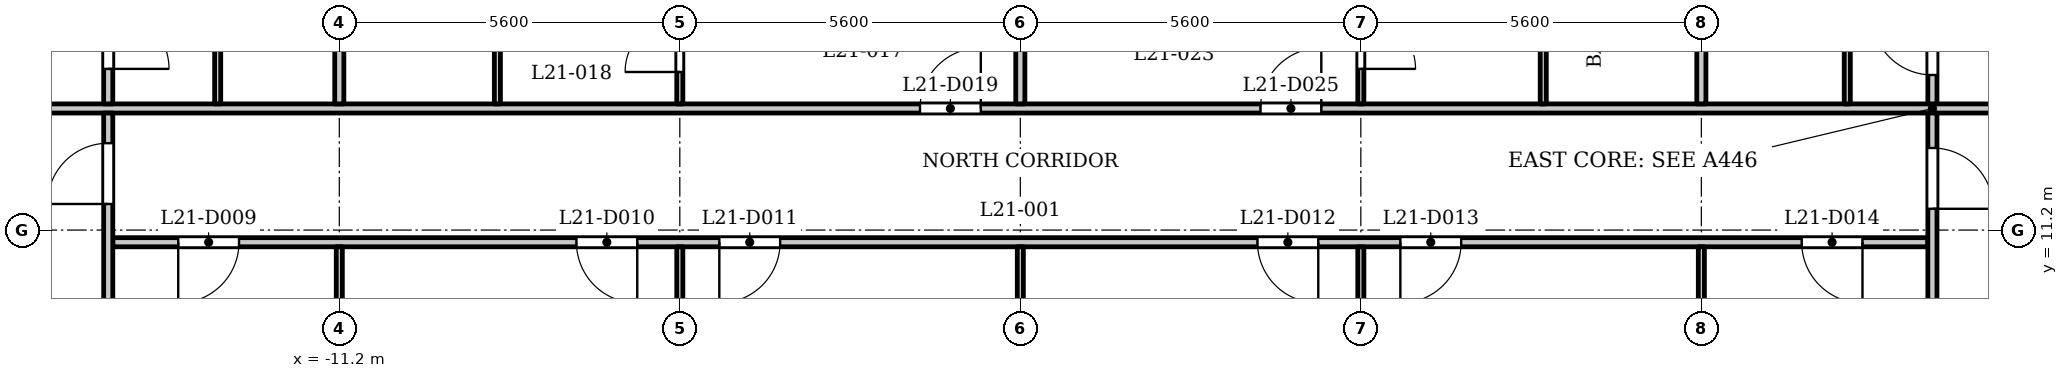
"""IFC4 building model, lengths in metres.
Left out: names, types, materials, properties, quantities, classifications, styles, units other than length and angle.
Written with IfcOpenShell. Run it as: python <this file> out.ifc"""

import sys

from ifc_helpers import new_model, si_unit, direction, frame, frame_2d, origin, place, context, subcontext, project, spatial, rectangle, extrude, element, fill, save


model = new_model("IFC4")
c1 = context("Model", 3, precision=1e-05, world=origin(), true_north=direction((0.0, 1.0)))
c2 = subcontext(c1, "Body", "Model", "MODEL_VIEW")
j1 = project(units=[si_unit("LENGTHUNIT", "METRE"), si_unit("PLANEANGLEUNIT", "RADIAN")], contexts=[c1])
p1 = place(None, origin())
s1 = spatial("IfcSite", under=j1, at=p1, CompositionType="ELEMENT")
p2 = place(p1, origin())
s2 = spatial("IfcBuilding", under=s1, at=p2, CompositionType="ELEMENT")
p3 = place(p2, frame((0.0, 0.0, 86.8)))
s3 = spatial("IfcBuildingStorey", under=s2, at=p3, CompositionType="ELEMENT", Elevation=86.8)
p4 = place(p3, frame((-14.925, 11.0, 0.0), z_axis=(0.0, 0.0, 1.0), x_axis=(1.0, 0.0, 0.0)))
e1 = element("IfcWall", 1, at=p4, inside=s3, PredefinedType="PARTITIONING", context=c2, shape_type="SweptSolid", body=[
    extrude(rectangle(XDim=29.85, YDim=0.15, at=frame_2d((14.925, 0.0))), origin(), (0.0, 0.0, 1.0), 3.2),
])
p5 = place(p4, frame((1.076, 0.0, 0.0)))
e2 = element("IfcOpeningElement", 2, at=p5, cuts=e1, PredefinedType="OPENING", context=c2, shape_type="SweptSolid", body=[
    extrude(rectangle(XDim=1.0, YDim=2.1, at=frame_2d((0.5, 1.05))), frame((0.0, 0.085, 0.0), z_axis=(0.0, -1.0, 0.0), x_axis=(1.0, 0.0, 0.0)), (0.0, 0.0, 1.0), 0.17),
])
p6 = place(p4, frame((7.625, 0.0, 0.0)))
e3 = element("IfcOpeningElement", 3, at=p6, cuts=e1, PredefinedType="OPENING", context=c2, shape_type="SweptSolid", body=[
    extrude(rectangle(XDim=1.0, YDim=2.1, at=frame_2d((0.5, 1.05))), frame((0.0, 0.085, 0.0), z_axis=(0.0, -1.0, 0.0), x_axis=(1.0, 0.0, 0.0)), (0.0, 0.0, 1.0), 0.17),
])
p7 = place(p4, frame((9.975, 0.0, 0.0)))
e4 = element("IfcOpeningElement", 4, at=p7, cuts=e1, PredefinedType="OPENING", context=c2, shape_type="SweptSolid", body=[
    extrude(rectangle(XDim=1.0, YDim=2.1, at=frame_2d((0.5, 1.05))), frame((0.0, 0.085, 0.0), z_axis=(0.0, -1.0, 0.0), x_axis=(1.0, 0.0, 0.0)), (0.0, 0.0, 1.0), 0.17),
])
p8 = place(p4, frame((18.825, 0.0, 0.0)))
e5 = element("IfcOpeningElement", 5, at=p8, cuts=e1, PredefinedType="OPENING", context=c2, shape_type="SweptSolid", body=[
    extrude(rectangle(XDim=1.0, YDim=2.1, at=frame_2d((0.5, 1.05))), frame((0.0, 0.085, 0.0), z_axis=(0.0, -1.0, 0.0), x_axis=(1.0, 0.0, 0.0)), (0.0, 0.0, 1.0), 0.17),
])
p9 = place(p4, frame((21.175, 0.0, 0.0)))
e6 = element("IfcOpeningElement", 6, at=p9, cuts=e1, PredefinedType="OPENING", context=c2, shape_type="SweptSolid", body=[
    extrude(rectangle(XDim=1.0, YDim=2.1, at=frame_2d((0.5, 1.05))), frame((0.0, 0.085, 0.0), z_axis=(0.0, -1.0, 0.0), x_axis=(1.0, 0.0, 0.0)), (0.0, 0.0, 1.0), 0.17),
])
p10 = place(p4, frame((27.775, 0.0, 0.0)))
e7 = element("IfcOpeningElement", 7, at=p10, cuts=e1, PredefinedType="OPENING", context=c2, shape_type="SweptSolid", body=[
    extrude(rectangle(XDim=1.0, YDim=2.1, at=frame_2d((0.5, 1.05))), frame((0.0, 0.085, 0.0), z_axis=(0.0, -1.0, 0.0), x_axis=(1.0, 0.0, 0.0)), (0.0, 0.0, 1.0), 0.17),
])
p11 = place(p3, frame((-17.4, 13.2, 0.0), z_axis=(0.0, 0.0, 1.0), x_axis=(1.0, 0.0, 0.0)))
e8 = element("IfcWall", 8, at=p11, inside=s3, PredefinedType="PARTITIONING", context=c2, shape_type="SweptSolid", body=[
    extrude(rectangle(XDim=34.8, YDim=0.15, at=frame_2d((17.4, 0.0))), origin(), (0.0, 0.0, 1.0), 3.2),
])
p12 = place(p11, frame((0.25, 0.0, 0.0)))
e9 = element("IfcOpeningElement", 9, at=p12, cuts=e8, PredefinedType="OPENING", context=c2, shape_type="SweptSolid", body=[
    extrude(rectangle(XDim=1.0, YDim=2.1, at=frame_2d((0.5, 1.05))), frame((0.0, 0.085, 0.0), z_axis=(0.0, -1.0, 0.0), x_axis=(1.0, 0.0, 0.0)), (0.0, 0.0, 1.0), 0.17),
])
p13 = place(p11, frame((33.65, 0.0, 0.0)))
e10 = element("IfcOpeningElement", 10, at=p13, cuts=e8, PredefinedType="OPENING", context=c2, shape_type="SweptSolid", body=[
    extrude(rectangle(XDim=1.0, YDim=2.1, at=frame_2d((0.5, 1.05))), frame((0.0, 0.085, 0.0), z_axis=(0.0, -1.0, 0.0), x_axis=(1.0, 0.0, 0.0)), (0.0, 0.0, 1.0), 0.17),
])
p14 = place(p11, frame((15.75, 0.0, 0.0)))
e11 = element("IfcOpeningElement", 11, at=p14, cuts=e8, PredefinedType="OPENING", context=c2, shape_type="SweptSolid", body=[
    extrude(rectangle(XDim=1.0, YDim=2.1, at=frame_2d((0.5, 1.05))), frame((0.0, 0.085, 0.0), z_axis=(0.0, -1.0, 0.0), x_axis=(1.0, 0.0, 0.0)), (0.0, 0.0, 1.0), 0.17),
])
p15 = place(p11, frame((21.35, 0.0, 0.0)))
e12 = element("IfcOpeningElement", 12, at=p15, cuts=e8, PredefinedType="OPENING", context=c2, shape_type="SweptSolid", body=[
    extrude(rectangle(XDim=1.0, YDim=2.1, at=frame_2d((0.5, 1.05))), frame((0.0, 0.085, 0.0), z_axis=(0.0, -1.0, 0.0), x_axis=(1.0, 0.0, 0.0)), (0.0, 0.0, 1.0), 0.17),
])
p16 = place(p3, frame((-15.0, 6.769, 0.0), z_axis=(0.0, 0.0, 1.0), x_axis=(0.0, 1.0, 0.0)))
e13 = element("IfcWall", 13, at=p16, inside=s3, PredefinedType="PARTITIONING", context=c2, shape_type="SweptSolid", body=[
    extrude(rectangle(XDim=6.356, YDim=0.15, at=frame_2d((3.178, 0.0))), origin(), (0.0, 0.0, 1.0), 3.2),
])
p17 = place(p16, frame((4.86, 0.0, 0.0)))
e14 = element("IfcOpeningElement", 14, at=p17, cuts=e13, PredefinedType="OPENING", context=c2, shape_type="SweptSolid", body=[
    extrude(rectangle(XDim=1.0, YDim=2.1, at=frame_2d((0.5, 1.05))), frame((0.0, 0.085, 0.0), z_axis=(0.0, -1.0, 0.0), x_axis=(1.0, 0.0, 0.0)), (0.0, 0.0, 1.0), 0.17),
])
p18 = place(p3, frame((-15.0, 13.275, 0.0), z_axis=(0.0, 0.0, 1.0), x_axis=(0.0, 1.0, 0.0)))
e15 = element("IfcWall", 15, at=p18, inside=s3, PredefinedType="PARTITIONING", context=c2, shape_type="SweptSolid", body=[
    extrude(rectangle(XDim=2.05, YDim=0.15, at=frame_2d((1.025, 0.0))), origin(), (0.0, 0.0, 1.0), 3.2),
])
p19 = place(p18, frame((0.576, 0.0, 0.0)))
e16 = element("IfcOpeningElement", 16, at=p19, cuts=e15, PredefinedType="OPENING", context=c2, shape_type="SweptSolid", body=[
    extrude(rectangle(XDim=1.0, YDim=2.1, at=frame_2d((0.5, 1.05))), frame((0.0, 0.085, 0.0), z_axis=(0.0, -1.0, 0.0), x_axis=(1.0, 0.0, 0.0)), (0.0, 0.0, 1.0), 0.17),
])
p20 = place(p3, frame((-13.2, 13.275, 0.0), z_axis=(0.0, 0.0, 1.0), x_axis=(0.0, 1.0, 0.0)))
e17 = element("IfcWall", 17, at=p20, inside=s3, PredefinedType="PARTITIONING", context=c2, shape_type="SweptSolid", body=[
    extrude(rectangle(XDim=3.775, YDim=0.1, at=frame_2d((1.888, 0.0))), origin(), (0.0, 0.0, 1.0), 3.2),
])
p21 = place(p3, frame((-11.2, 7.32, 0.0), z_axis=(0.0, 0.0, 1.0), x_axis=(0.0, 1.0, 0.0)))
e18 = element("IfcWall", 18, at=p21, inside=s3, PredefinedType="PARTITIONING", context=c2, shape_type="SweptSolid", body=[
    extrude(rectangle(XDim=3.605, YDim=0.1, at=frame_2d((1.802, 0.0))), origin(), (0.0, 0.0, 1.0), 3.2),
])
p22 = place(p3, frame((-11.2, 13.275, 0.0), z_axis=(0.0, 0.0, 1.0), x_axis=(0.0, 1.0, 0.0)))
e19 = element("IfcWall", 19, at=p22, inside=s3, PredefinedType="PARTITIONING", context=c2, shape_type="SweptSolid", body=[
    extrude(rectangle(XDim=3.775, YDim=0.15, at=frame_2d((1.888, 0.0))), origin(), (0.0, 0.0, 1.0), 3.2),
])
p23 = place(p3, frame((-8.6, 13.275, 0.0), z_axis=(0.0, 0.0, 1.0), x_axis=(0.0, 1.0, 0.0)))
e20 = element("IfcWall", 20, at=p23, inside=s3, PredefinedType="PARTITIONING", context=c2, shape_type="SweptSolid", body=[
    extrude(rectangle(XDim=3.775, YDim=0.1, at=frame_2d((1.888, 0.0))), origin(), (0.0, 0.0, 1.0), 3.2),
])
p24 = place(p3, frame((-5.6, 7.32, 0.0), z_axis=(0.0, 0.0, 1.0), x_axis=(0.0, 1.0, 0.0)))
e21 = element("IfcWall", 21, at=p24, inside=s3, PredefinedType="PARTITIONING", context=c2, shape_type="SweptSolid", body=[
    extrude(rectangle(XDim=3.605, YDim=0.1, at=frame_2d((1.802, 0.0))), origin(), (0.0, 0.0, 1.0), 3.2),
])
p25 = place(p3, frame((-5.6, 13.275, 0.0), z_axis=(0.0, 0.0, 1.0), x_axis=(0.0, 1.0, 0.0)))
e22 = element("IfcWall", 22, at=p25, inside=s3, PredefinedType="PARTITIONING", context=c2, shape_type="SweptSolid", body=[
    extrude(rectangle(XDim=3.775, YDim=0.1, at=frame_2d((1.888, 0.0))), origin(), (0.0, 0.0, 1.0), 3.2),
])
p26 = place(p25, frame((0.525, 0.0, 0.0)))
e23 = element("IfcOpeningElement", 23, at=p26, cuts=e22, PredefinedType="OPENING", context=c2, shape_type="SweptSolid", body=[
    extrude(rectangle(XDim=0.9, YDim=2.1, at=frame_2d((0.45, 1.05))), frame((0.0, 0.06, 0.0), z_axis=(0.0, -1.0, 0.0), x_axis=(1.0, 0.0, 0.0)), (0.0, 0.0, 1.0), 0.12),
])
p27 = place(p3, frame((0.0, 7.32, 0.0), z_axis=(0.0, 0.0, 1.0), x_axis=(0.0, 1.0, 0.0)))
e24 = element("IfcWall", 24, at=p27, inside=s3, PredefinedType="PARTITIONING", context=c2, shape_type="SweptSolid", body=[
    extrude(rectangle(XDim=3.605, YDim=0.1, at=frame_2d((1.802, 0.0))), origin(), (0.0, 0.0, 1.0), 3.2),
])
p28 = place(p3, frame((0.0, 13.275, 0.0), z_axis=(0.0, 0.0, 1.0), x_axis=(0.0, 1.0, 0.0)))
e25 = element("IfcWall", 25, at=p28, inside=s3, PredefinedType="PARTITIONING", context=c2, shape_type="SweptSolid", body=[
    extrude(rectangle(XDim=3.775, YDim=0.15, at=frame_2d((1.888, 0.0))), origin(), (0.0, 0.0, 1.0), 3.2),
])
p29 = place(p3, frame((5.6, 7.32, 0.0), z_axis=(0.0, 0.0, 1.0), x_axis=(0.0, 1.0, 0.0)))
e26 = element("IfcWall", 26, at=p29, inside=s3, PredefinedType="PARTITIONING", context=c2, shape_type="SweptSolid", body=[
    extrude(rectangle(XDim=3.605, YDim=0.1, at=frame_2d((1.802, 0.0))), origin(), (0.0, 0.0, 1.0), 3.2),
])
p30 = place(p3, frame((5.6, 13.275, 0.0), z_axis=(0.0, 0.0, 1.0), x_axis=(0.0, 1.0, 0.0)))
e27 = element("IfcWall", 27, at=p30, inside=s3, PredefinedType="PARTITIONING", context=c2, shape_type="SweptSolid", body=[
    extrude(rectangle(XDim=3.775, YDim=0.1, at=frame_2d((1.888, 0.0))), origin(), (0.0, 0.0, 1.0), 3.2),
])
p31 = place(p30, frame((0.576, 0.0, 0.0)))
e28 = element("IfcOpeningElement", 28, at=p31, cuts=e27, PredefinedType="OPENING", context=c2, shape_type="SweptSolid", body=[
    extrude(rectangle(XDim=0.9, YDim=2.1, at=frame_2d((0.45, 1.05))), frame((0.0, 0.06, 0.0), z_axis=(0.0, -1.0, 0.0), x_axis=(1.0, 0.0, 0.0)), (0.0, 0.0, 1.0), 0.12),
])
p32 = place(p3, frame((8.6, 13.275, 0.0), z_axis=(0.0, 0.0, 1.0), x_axis=(0.0, 1.0, 0.0)))
e29 = element("IfcWall", 29, at=p32, inside=s3, PredefinedType="PARTITIONING", context=c2, shape_type="SweptSolid", body=[
    extrude(rectangle(XDim=3.775, YDim=0.1, at=frame_2d((1.888, 0.0))), origin(), (0.0, 0.0, 1.0), 3.2),
])
p33 = place(p3, frame((11.2, 7.32, 0.0), z_axis=(0.0, 0.0, 1.0), x_axis=(0.0, 1.0, 0.0)))
e30 = element("IfcWall", 30, at=p33, inside=s3, PredefinedType="PARTITIONING", context=c2, shape_type="SweptSolid", body=[
    extrude(rectangle(XDim=3.605, YDim=0.1, at=frame_2d((1.802, 0.0))), origin(), (0.0, 0.0, 1.0), 3.2),
])
p34 = place(p3, frame((11.2, 13.275, 0.0), z_axis=(0.0, 0.0, 1.0), x_axis=(0.0, 1.0, 0.0)))
e31 = element("IfcWall", 31, at=p34, inside=s3, PredefinedType="PARTITIONING", context=c2, shape_type="SweptSolid", body=[
    extrude(rectangle(XDim=3.775, YDim=0.15, at=frame_2d((1.888, 0.0))), origin(), (0.0, 0.0, 1.0), 3.2),
])
p35 = place(p3, frame((13.6, 13.275, 0.0), z_axis=(0.0, 0.0, 1.0), x_axis=(0.0, 1.0, 0.0)))
e32 = element("IfcWall", 32, at=p35, inside=s3, PredefinedType="PARTITIONING", context=c2, shape_type="SweptSolid", body=[
    extrude(rectangle(XDim=3.775, YDim=0.1, at=frame_2d((1.888, 0.0))), origin(), (0.0, 0.0, 1.0), 3.2),
])
p36 = place(p3, frame((15.0, 6.769, 0.0), z_axis=(0.0, 0.0, 1.0), x_axis=(0.0, 1.0, 0.0)))
e33 = element("IfcWall", 33, at=p36, inside=s3, PredefinedType="PARTITIONING", context=c2, shape_type="SweptSolid", body=[
    extrude(rectangle(XDim=6.356, YDim=0.15, at=frame_2d((3.178, 0.0))), origin(), (0.0, 0.0, 1.0), 3.2),
])
p37 = place(p36, frame((4.781, 0.0, 0.0)))
e34 = element("IfcOpeningElement", 34, at=p37, cuts=e33, PredefinedType="OPENING", context=c2, shape_type="SweptSolid", body=[
    extrude(rectangle(XDim=1.0, YDim=2.1, at=frame_2d((0.5, 1.05))), frame((0.0, 0.085, 0.0), z_axis=(0.0, -1.0, 0.0), x_axis=(1.0, 0.0, 0.0)), (0.0, 0.0, 1.0), 0.17),
])
p38 = place(p3, frame((15.0, 13.275, 0.0), z_axis=(0.0, 0.0, 1.0), x_axis=(0.0, 1.0, 0.0)))
e35 = element("IfcWall", 35, at=p38, inside=s3, PredefinedType="PARTITIONING", context=c2, shape_type="SweptSolid", body=[
    extrude(rectangle(XDim=2.05, YDim=0.15, at=frame_2d((1.025, 0.0))), origin(), (0.0, 0.0, 1.0), 3.2),
])
p39 = place(p38, frame((0.476, 0.0, 0.0)))
e36 = element("IfcOpeningElement", 36, at=p39, cuts=e35, PredefinedType="OPENING", context=c2, shape_type="SweptSolid", body=[
    extrude(rectangle(XDim=1.0, YDim=2.1, at=frame_2d((0.5, 1.05))), frame((0.0, 0.085, 0.0), z_axis=(0.0, -1.0, 0.0), x_axis=(1.0, 0.0, 0.0)), (0.0, 0.0, 1.0), 0.17),
])
p40 = place(p17, origin())
e37 = element("IfcDoor", 37, at=p40, inside=s3, OperationType="SINGLE_SWING_RIGHT", PredefinedType="DOOR", context=c2, shape_type="SweptSolid", body=[
    extrude(rectangle(XDim=1.0, YDim=2.1, at=frame_2d((0.5, 1.05))), frame((0.0, 0.025, 0.0), z_axis=(0.0, -1.0, 0.0), x_axis=(1.0, 0.0, 0.0)), (0.0, 0.0, 1.0), 0.05),
])
fill(e14, e37)
p41 = place(p37, origin())
e38 = element("IfcDoor", 38, at=p41, inside=s3, OperationType="SINGLE_SWING_LEFT", PredefinedType="DOOR", context=c2, shape_type="SweptSolid", body=[
    extrude(rectangle(XDim=1.0, YDim=2.1, at=frame_2d((0.5, 1.05))), frame((0.0, 0.025, 0.0), z_axis=(0.0, -1.0, 0.0), x_axis=(1.0, 0.0, 0.0)), (0.0, 0.0, 1.0), 0.05),
])
fill(e34, e38)
p42 = place(p5, origin())
e39 = element("IfcDoor", 39, at=p42, inside=s3, OperationType="SINGLE_SWING_LEFT", PredefinedType="DOOR", context=c2, shape_type="SweptSolid", body=[
    extrude(rectangle(XDim=1.0, YDim=2.1, at=frame_2d((0.5, 1.05))), frame((0.0, 0.025, 0.0), z_axis=(0.0, -1.0, 0.0), x_axis=(1.0, 0.0, 0.0)), (0.0, 0.0, 1.0), 0.05),
])
fill(e2, e39)
p43 = place(p6, origin())
e40 = element("IfcDoor", 40, at=p43, inside=s3, OperationType="SINGLE_SWING_RIGHT", PredefinedType="DOOR", context=c2, shape_type="SweptSolid", body=[
    extrude(rectangle(XDim=1.0, YDim=2.1, at=frame_2d((0.5, 1.05))), frame((0.0, 0.025, 0.0), z_axis=(0.0, -1.0, 0.0), x_axis=(1.0, 0.0, 0.0)), (0.0, 0.0, 1.0), 0.05),
])
fill(e3, e40)
p44 = place(p7, origin())
e41 = element("IfcDoor", 41, at=p44, inside=s3, OperationType="SINGLE_SWING_LEFT", PredefinedType="DOOR", context=c2, shape_type="SweptSolid", body=[
    extrude(rectangle(XDim=1.0, YDim=2.1, at=frame_2d((0.5, 1.05))), frame((0.0, 0.025, 0.0), z_axis=(0.0, -1.0, 0.0), x_axis=(1.0, 0.0, 0.0)), (0.0, 0.0, 1.0), 0.05),
])
fill(e4, e41)
p45 = place(p8, origin())
e42 = element("IfcDoor", 42, at=p45, inside=s3, OperationType="SINGLE_SWING_RIGHT", PredefinedType="DOOR", context=c2, shape_type="SweptSolid", body=[
    extrude(rectangle(XDim=1.0, YDim=2.1, at=frame_2d((0.5, 1.05))), frame((0.0, 0.025, 0.0), z_axis=(0.0, -1.0, 0.0), x_axis=(1.0, 0.0, 0.0)), (0.0, 0.0, 1.0), 0.05),
])
fill(e5, e42)
p46 = place(p9, origin())
e43 = element("IfcDoor", 43, at=p46, inside=s3, OperationType="SINGLE_SWING_LEFT", PredefinedType="DOOR", context=c2, shape_type="SweptSolid", body=[
    extrude(rectangle(XDim=1.0, YDim=2.1, at=frame_2d((0.5, 1.05))), frame((0.0, 0.025, 0.0), z_axis=(0.0, -1.0, 0.0), x_axis=(1.0, 0.0, 0.0)), (0.0, 0.0, 1.0), 0.05),
])
fill(e6, e43)
p47 = place(p10, origin())
e44 = element("IfcDoor", 44, at=p47, inside=s3, OperationType="SINGLE_SWING_RIGHT", PredefinedType="DOOR", context=c2, shape_type="SweptSolid", body=[
    extrude(rectangle(XDim=1.0, YDim=2.1, at=frame_2d((0.5, 1.05))), frame((0.0, 0.025, 0.0), z_axis=(0.0, -1.0, 0.0), x_axis=(1.0, 0.0, 0.0)), (0.0, 0.0, 1.0), 0.05),
])
fill(e7, e44)
p48 = place(p19, origin())
e45 = element("IfcDoor", 45, at=p48, inside=s3, OperationType="SINGLE_SWING_LEFT", PredefinedType="DOOR", context=c2, shape_type="SweptSolid", body=[
    extrude(rectangle(XDim=1.0, YDim=2.1, at=frame_2d((0.5, 1.05))), frame((0.0, 0.025, 0.0), z_axis=(0.0, -1.0, 0.0), x_axis=(1.0, 0.0, 0.0)), (0.0, 0.0, 1.0), 0.05),
])
fill(e16, e45)
p49 = place(p14, origin())
e46 = element("IfcDoor", 46, at=p49, inside=s3, OperationType="SINGLE_SWING_LEFT", PredefinedType="DOOR", context=c2, shape_type="SweptSolid", body=[
    extrude(rectangle(XDim=1.0, YDim=2.1, at=frame_2d((0.5, 1.05))), frame((0.0, 0.025, 0.0), z_axis=(0.0, -1.0, 0.0), x_axis=(1.0, 0.0, 0.0)), (0.0, 0.0, 1.0), 0.05),
])
fill(e11, e46)
p50 = place(p26, origin())
e47 = element("IfcDoor", 47, at=p50, inside=s3, OperationType="SINGLE_SWING_RIGHT", PredefinedType="DOOR", context=c2, shape_type="SweptSolid", body=[
    extrude(rectangle(XDim=0.9, YDim=2.1, at=frame_2d((0.45, 1.05))), frame((0.0, 0.025, 0.0), z_axis=(0.0, -1.0, 0.0), x_axis=(1.0, 0.0, 0.0)), (0.0, 0.0, 1.0), 0.05),
])
fill(e23, e47)
p51 = place(p15, origin())
e48 = element("IfcDoor", 48, at=p51, inside=s3, OperationType="SINGLE_SWING_LEFT", PredefinedType="DOOR", context=c2, shape_type="SweptSolid", body=[
    extrude(rectangle(XDim=1.0, YDim=2.1, at=frame_2d((0.5, 1.05))), frame((0.0, 0.025, 0.0), z_axis=(0.0, -1.0, 0.0), x_axis=(1.0, 0.0, 0.0)), (0.0, 0.0, 1.0), 0.05),
])
fill(e12, e48)
p52 = place(p31, origin())
e49 = element("IfcDoor", 49, at=p52, inside=s3, OperationType="SINGLE_SWING_LEFT", PredefinedType="DOOR", context=c2, shape_type="SweptSolid", body=[
    extrude(rectangle(XDim=0.9, YDim=2.1, at=frame_2d((0.45, 1.05))), frame((0.0, 0.025, 0.0), z_axis=(0.0, -1.0, 0.0), x_axis=(1.0, 0.0, 0.0)), (0.0, 0.0, 1.0), 0.05),
])
fill(e28, e49)
p53 = place(p39, origin())
e50 = element("IfcDoor", 50, at=p53, inside=s3, OperationType="SINGLE_SWING_LEFT", PredefinedType="DOOR", context=c2, shape_type="SweptSolid", body=[
    extrude(rectangle(XDim=1.0, YDim=2.1, at=frame_2d((0.5, 1.05))), frame((0.0, 0.025, 0.0), z_axis=(0.0, -1.0, 0.0), x_axis=(1.0, 0.0, 0.0)), (0.0, 0.0, 1.0), 0.05),
])
fill(e36, e50)
save(model, sys.argv[1])
